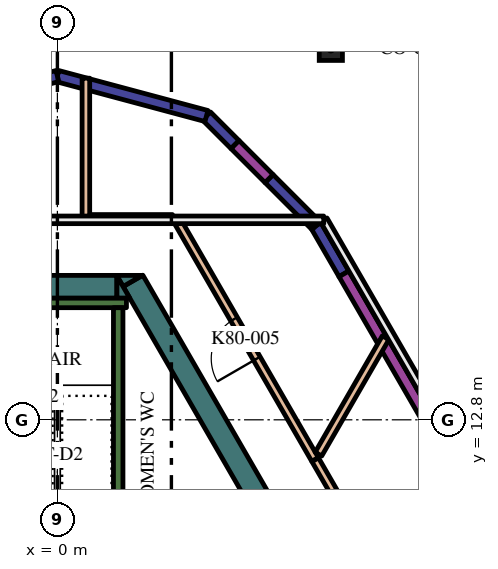
"""IFC4 building model, lengths in metres.
Left out: names, types, materials, properties, quantities, classifications, styles, units other than length and angle.
Written with IfcOpenShell. Run it as: python <this file> out.ifc"""

import sys

from ifc_helpers import new_model, si_unit, direction, frame, frame_2d, origin, origin_2d, place, context, subcontext, project, spatial, polyline, rectangle, hollow_circle, outline, extrude, element, fill, save


model = new_model("IFC4")
c1 = context("Model", 3, precision=1e-05, world=origin(), true_north=direction((0.0, 1.0)))
c2 = subcontext(c1, "Body", "Model", "MODEL_VIEW")
j1 = project(units=[si_unit("LENGTHUNIT", "METRE"), si_unit("PLANEANGLEUNIT", "RADIAN")], contexts=[c1])
p1 = place(None, origin())
s1 = spatial("IfcSite", under=j1, at=p1, CompositionType="ELEMENT")
p2 = place(p1, origin())
s2 = spatial("IfcBuilding", under=s1, at=p2, CompositionType="ELEMENT")
p3 = place(p2, frame((0.0, 0.0, 344.4)))
s3 = spatial("IfcBuildingStorey", under=s2, at=p3, CompositionType="ELEMENT", Elevation=344.4)
p4 = place(p3, frame((7.195, 22.561, 0.0), z_axis=(0.0, 0.0, 1.0), x_axis=(1.0, 0.0, 0.0)))
e1 = element("IfcColumn", 1, at=p4, inside=s3, PredefinedType="COLUMN", context=c2, shape_type="SweptSolid", body=[
    extrude(hollow_circle(Radius=0.305, WallThickness=0.025, at=origin_2d()), origin(), (0.0, 0.0, 1.0), 4.2),
])
p5 = place(p3, frame((1.989, 16.456, 0.0), z_axis=(0.0, 0.0, 1.0), x_axis=(0.499990476767, -0.866030901956, 0.0)))
e2 = element("IfcWall", 2, at=p5, inside=s3, PredefinedType="SOLIDWALL", context=c2, shape_type="SweptSolid", body=[
    extrude(rectangle(XDim=7.438, YDim=0.6, at=frame_2d((3.719, 0.0))), origin(), (0.0, 0.0, 1.0), 4.2),
])
p6 = place(p3, origin())
e3 = element("IfcWall", 3, at=p6, inside=s3, PredefinedType="SOLIDWALL", context=c2, shape_type="SweptSolid", body=[
    extrude(outline(polyline([(1.559, 16.6), (2.235, 16.6), (1.728, 16.307), (1.559, 16.6)])), origin(), (0.0, 0.0, 1.0), 4.2),
])
p7 = place(p3, frame((-2.258, 16.3, 0.0), z_axis=(0.0, 0.0, 1.0), x_axis=(1.0, 0.0, 0.0)))
e4 = element("IfcWall", 4, at=p7, inside=s3, PredefinedType="SOLIDWALL", context=c2, shape_type="SweptSolid", body=[
    extrude(rectangle(XDim=3.823, YDim=0.6, at=frame_2d((1.912, 0.0))), origin(), (0.0, 0.0, 1.0), 4.2),
])
e5 = element("IfcWall", 5, at=p6, inside=s3, PredefinedType="SOLIDWALL", context=c2, shape_type="SweptSolid", body=[
    extrude(outline(polyline([(1.905, 16.0), (1.567, 16.0), (1.567, 16.585), (1.905, 16.0)])), origin(), (0.0, 0.0, 1.0), 4.2),
])
p8 = place(p3, frame((-1.817, 15.875, 0.0), z_axis=(0.0, 0.0, 1.0), x_axis=(1.0, 0.0, 0.0)))
e6 = element("IfcWall", 6, at=p8, inside=s3, PredefinedType="SOLIDWALL", context=c2, shape_type="SweptSolid", body=[
    extrude(rectangle(XDim=3.634, YDim=0.25, at=frame_2d((1.817, 0.0))), origin(), (0.0, 0.0, 1.0), 4.2),
])
p9 = place(p3, frame((1.6, 8.95, 0.0), z_axis=(0.0, 0.0, 1.0), x_axis=(0.0, 1.0, 0.0)))
e7 = element("IfcWall", 7, at=p9, inside=s3, PredefinedType="SOLIDWALL", context=c2, shape_type="SweptSolid", body=[
    extrude(rectangle(XDim=6.8, YDim=0.25, at=frame_2d((3.4, 0.0))), origin(), (0.0, 0.0, 1.0), 4.2),
])
p10 = place(p3, frame((17.234, -6.35, 0.0), z_axis=(0.0, 0.0, 1.0), x_axis=(-0.499998496574, 0.866026271786, 0.0)))
e8 = element("IfcWall", 8, at=p10, inside=s3, PredefinedType="PARTITIONING", context=c2, shape_type="SweptSolid", body=[
    extrude(rectangle(XDim=20.9, YDim=0.2, at=frame_2d((10.45, 0.0))), origin(), (0.0, 0.0, 1.0), 3.3),
])
p11 = place(p10, frame((9.65, 0.0, 0.0)))
e9 = element("IfcOpeningElement", 9, at=p11, cuts=e8, PredefinedType="OPENING", context=c2, shape_type="SweptSolid", body=[
    extrude(rectangle(XDim=1.6, YDim=2.1, at=frame_2d((0.8, 1.05))), frame((0.0, 0.11, 0.0), z_axis=(0.0, -1.0, 0.0), x_axis=(1.0, 0.0, 0.0)), (0.0, 0.0, 1.0), 0.22),
])
p12 = place(p3, frame((6.779, 11.759, 0.0), z_axis=(0.0, 0.0, 1.0), x_axis=(-0.50000817069, 0.866020686383, 0.0)))
e10 = element("IfcWall", 10, at=p12, inside=s3, PredefinedType="PARTITIONING", context=c2, shape_type="SweptSolid", body=[
    extrude(rectangle(XDim=7.323, YDim=0.2, at=frame_2d((3.661, 0.0))), origin(), (0.0, 0.0, 1.0), 3.3),
])
p13 = place(p12, frame((3.061, 0.0, 0.0)))
e11 = element("IfcOpeningElement", 11, at=p13, cuts=e10, PredefinedType="OPENING", context=c2, shape_type="SweptSolid", body=[
    extrude(rectangle(XDim=1.2, YDim=2.1, at=frame_2d((0.6, 1.05))), frame((0.0, 0.11, 0.0), z_axis=(0.0, -1.0, 0.0), x_axis=(1.0, 0.0, 0.0)), (0.0, 0.0, 1.0), 0.22),
])
p14 = place(p3, frame((6.869, 11.897, 0.0), z_axis=(0.0, 0.0, 1.0), x_axis=(0.500037187688, 0.866003932398, 0.0)))
e12 = element("IfcWall", 12, at=p14, inside=s3, PredefinedType="PARTITIONING", context=c2, shape_type="SweptSolid", body=[
    extrude(rectangle(XDim=3.536, YDim=0.2, at=frame_2d((1.768, 0.0))), origin(), (0.0, 0.0, 1.0), 3.3),
])
p15 = place(p3, frame((0.75, 21.789, 0.0), z_axis=(0.0, 0.0, 1.0), x_axis=(0.0, -1.0, 0.0)))
e13 = element("IfcWall", 13, at=p15, inside=s3, PredefinedType="PARTITIONING", context=c2, shape_type="SweptSolid", body=[
    extrude(rectangle(XDim=3.688, YDim=0.2, at=frame_2d((1.844, 0.0))), origin(), (0.0, 0.0, 1.0), 3.3),
])
p16 = place(p3, frame((0.85, 18.1, 0.0), z_axis=(0.0, 0.0, 1.0), x_axis=(1.0, 0.0, 0.0)))
e14 = element("IfcWall", 14, at=p16, inside=s3, PredefinedType="PARTITIONING", context=c2, shape_type="SweptSolid", body=[
    extrude(rectangle(XDim=2.177, YDim=0.2, at=frame_2d((1.089, 0.0))), origin(), (0.0, 0.0, 1.0), 3.3),
])
p17 = place(p3, frame((18.181, -1.79, 0.0), z_axis=(0.0, 0.0, 1.0), x_axis=(-0.500002158106, 0.866024157798, 0.0)))
e15 = element("IfcWall", 15, at=p17, inside=s3, PredefinedType="SOLIDWALL", context=c2, shape_type="SweptSolid", body=[
    extrude(rectangle(XDim=21.282, YDim=0.3, at=frame_2d((10.641, 0.0))), origin(), (0.0, 0.0, 1.0), 3.3),
])
p18 = place(p3, frame((7.54, 16.64, 0.0), z_axis=(0.0, 0.0, 1.0), x_axis=(-0.499977492351, 0.866038398192, 0.0)))
e16 = element("IfcWall", 16, at=p18, inside=s3, PredefinedType="SOLIDWALL", context=c2, shape_type="SweptSolid", body=[
    extrude(rectangle(XDim=1.464, YDim=0.3, at=frame_2d((0.732, 0.0))), origin(), (0.0, 0.0, 1.0), 3.8),
])
p19 = place(p3, frame((6.808, 17.908, 0.0), z_axis=(0.0, 0.0, 1.0), x_axis=(-0.707106781187, 0.707106781187, 0.0)))
e17 = element("IfcWall", 17, at=p19, inside=s3, PredefinedType="SOLIDWALL", context=c2, shape_type="SweptSolid", body=[
    extrude(rectangle(XDim=1.752, YDim=0.3, at=frame_2d((0.876, 0.0))), origin(), (0.0, 0.0, 1.0), 3.8),
])
p20 = place(p3, frame((5.569, 19.147, 0.0), z_axis=(0.0, 0.0, 1.0), x_axis=(-0.707106781187, 0.707106781187, 0.0)))
e18 = element("IfcWall", 18, at=p20, inside=s3, PredefinedType="SOLIDWALL", context=c2, shape_type="SweptSolid", body=[
    extrude(rectangle(XDim=1.264, YDim=0.3, at=frame_2d((0.632, 0.0))), origin(), (0.0, 0.0, 1.0), 3.3),
])
p21 = place(p3, frame((4.675, 20.041, 0.0), z_axis=(0.0, 0.0, 1.0), x_axis=(-0.707106781187, 0.707106781187, 0.0)))
e19 = element("IfcWall", 19, at=p21, inside=s3, PredefinedType="SOLIDWALL", context=c2, shape_type="SweptSolid", body=[
    extrude(rectangle(XDim=1.065, YDim=0.3, at=frame_2d((0.532, 0.0))), origin(), (0.0, 0.0, 1.0), 3.8),
])
for number, where, z_axis, x_axis in (
    (20, (3.922, 20.794, 0.0), (0.0, 0.0, 1.0), (-0.966, 0.259, 0.0)),
    (21, (0.0, 21.845, 0.0), (0.0, 0.0, 1.0), (-0.966, -0.259, 0.0)),
):
    element("IfcWall", number, at=place(p3, frame(where, z_axis=z_axis, x_axis=x_axis)), inside=s3, PredefinedType="SOLIDWALL", context=c2, shape_type="SweptSolid", body=[
        extrude(rectangle(XDim=4.061, YDim=0.3, at=frame_2d((2.03, 0.0))), origin(), (0.0, 0.0, 1.0), 3.8),
    ])
p22 = place(p13, origin())
e22 = element("IfcDoor", 22, at=p22, inside=s3, OperationType="SINGLE_SWING_RIGHT", PredefinedType="DOOR", context=c2, shape_type="SweptSolid", body=[
    extrude(rectangle(XDim=1.2, YDim=2.1, at=frame_2d((0.6, 1.05))), frame((0.0, 0.025, 0.0), z_axis=(0.0, -1.0, 0.0), x_axis=(1.0, 0.0, 0.0)), (0.0, 0.0, 1.0), 0.05),
])
fill(e11, e22)
p23 = place(p2, frame((0.0, 0.0, 348.6)))
p24 = place(p23, origin())
p25 = place(p24, frame((0.0, 12.35, 0.0)))
p26 = place(p25, frame((0.0, 0.0, 1.15)))
e23 = element("IfcWindow", 23, at=p26, inside=s3, PartitioningType="SINGLE_PANEL", PredefinedType="WINDOW", context=c2, shape_type="SweptSolid", body=[
    extrude(rectangle(XDim=2.95, YDim=6.8, at=origin_2d()), origin(), (0.0, 0.0, 1.0), 0.05),
])
save(model, sys.argv[1])
